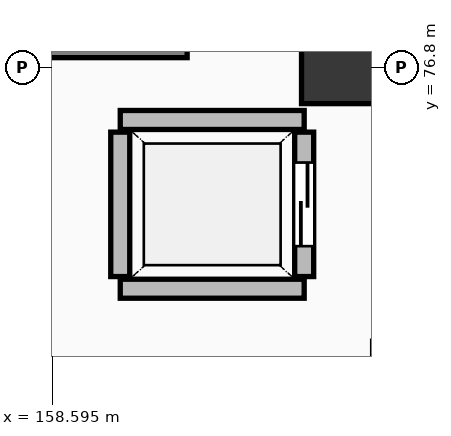
"""IFC4 building model, lengths in metres.
Left out: names, types, materials, properties, quantities, classifications, styles, units other than length and angle.
Written with IfcOpenShell. Run it as: python <this file> out.ifc"""

import sys

from ifc_helpers import new_model, si_unit, direction, frame, frame_2d, origin, origin_2d, place, context, subcontext, project, spatial, rectangle, extrude, element, fill, save


model = new_model("IFC4")
c1 = context("Model", 3, precision=1e-05, world=origin(), true_north=direction((0.0, 1.0)))
c2 = subcontext(c1, "Body", "Model", "MODEL_VIEW")
j1 = project(units=[si_unit("LENGTHUNIT", "METRE"), si_unit("PLANEANGLEUNIT", "RADIAN")], contexts=[c1])
p1 = place(None, origin())
s1 = spatial("IfcSite", under=j1, at=p1, CompositionType="ELEMENT")
p2 = place(p1, origin())
s2 = spatial("IfcBuilding", under=s1, at=p2, CompositionType="ELEMENT")
p3 = place(p2, frame((0.0, 0.0, 11.4)))
s3 = spatial("IfcBuildingStorey", under=s2, at=p3, CompositionType="ELEMENT", Elevation=11.4)
p4 = place(p3, frame((162.35, 76.8, 0.0), z_axis=(0.0, 0.0, 1.0), x_axis=(1.0, 0.0, 0.0)))
e1 = element("IfcColumn", 1, at=p4, inside=s3, PredefinedType="COLUMN", context=c2, shape_type="SweptSolid", body=[
    extrude(rectangle(XDim=0.95, YDim=0.95, at=origin_2d()), origin(), (0.0, 0.0, 1.0), 4.8),
])
p5 = place(p3, frame((156.7, 77.18, 0.0), z_axis=(0.0, 0.0, 1.0), x_axis=(1.0, 0.0, 0.0)))
e2 = element("IfcWall", 2, at=p5, inside=s3, PredefinedType="SHEAR", context=c2, shape_type="SweptSolid", body=[
    extrude(rectangle(XDim=3.67, YDim=0.5, at=frame_2d((1.835, 0.0))), origin(), (0.0, 0.0, 1.0), 4.42),
])
for number, where, z_axis, x_axis in (
    (3, (159.49, 73.89, 0.0), (0.0, 0.0, 1.0), (1.0, 0.0, 0.0)),
    (4, (159.49, 76.11, 0.0), (0.0, 0.0, 1.0), (1.0, 0.0, 0.0)),
):
    element("IfcWall", number, at=place(p3, frame(where, z_axis=z_axis, x_axis=x_axis)), inside=s3, PredefinedType="SOLIDWALL", context=c2, shape_type="SweptSolid", body=[
        extrude(rectangle(XDim=2.42, YDim=0.25, at=frame_2d((1.21, 0.0))), origin(), (0.0, 0.0, 1.0), 4.42),
    ])
p6 = place(p3, frame((159.49, 74.05, 0.0), z_axis=(0.0, 0.0, 1.0), x_axis=(0.0, 1.0, 0.0)))
e5 = element("IfcWall", 5, at=p6, inside=s3, PredefinedType="SOLIDWALL", context=c2, shape_type="SweptSolid", body=[
    extrude(rectangle(XDim=1.9, YDim=0.25, at=frame_2d((0.95, 0.0))), origin(), (0.0, 0.0, 1.0), 4.42),
])
p7 = place(p3, frame((161.91, 74.05, 0.0), z_axis=(0.0, 0.0, 1.0), x_axis=(0.0, 1.0, 0.0)))
e6 = element("IfcWall", 6, at=p7, inside=s3, PredefinedType="SOLIDWALL", context=c2, shape_type="SweptSolid", body=[
    extrude(rectangle(XDim=1.9, YDim=0.25, at=frame_2d((0.95, 0.0))), origin(), (0.0, 0.0, 1.0), 4.42),
])
p8 = place(p7, frame((0.4, 0.0, 0.0)))
e7 = element("IfcOpeningElement", 7, at=p8, cuts=e6, PredefinedType="OPENING", context=c2, shape_type="SweptSolid", body=[
    extrude(rectangle(XDim=1.1, YDim=2.2, at=frame_2d((0.55, 1.1))), frame((0.0, 0.137, 0.0), z_axis=(0.0, -1.0, 0.0), x_axis=(1.0, 0.0, 0.0)), (0.0, 0.0, 1.0), 0.274),
])
p9 = place(p8, origin())
e8 = element("IfcDoor", 8, at=p9, inside=s3, OperationType="SLIDING_TO_LEFT", PredefinedType="DOOR", context=c2, shape_type="SweptSolid", body=[
    extrude(rectangle(XDim=1.1, YDim=2.2, at=frame_2d((0.55, 1.1))), frame((0.0, 0.025, 0.0), z_axis=(0.0, -1.0, 0.0), x_axis=(1.0, 0.0, 0.0)), (0.0, 0.0, 1.0), 0.05),
])
fill(e7, e8)
save(model, sys.argv[1])
